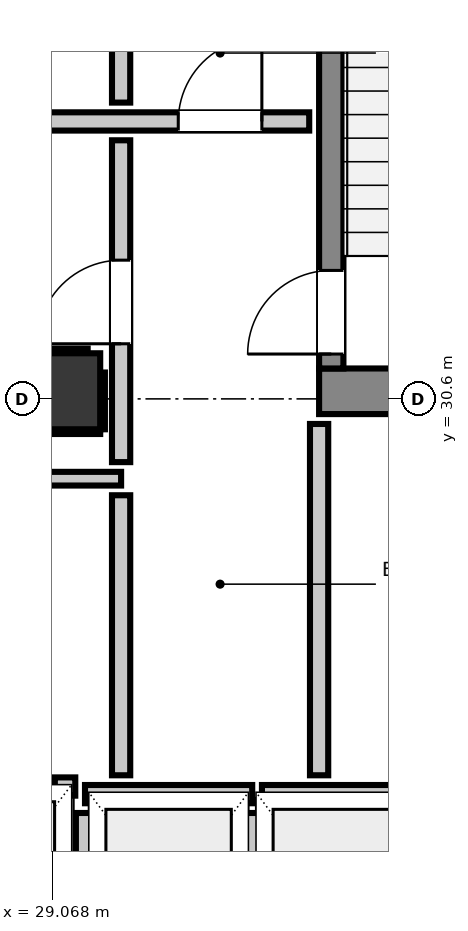
"""IFC4 building model, lengths in metres.
Left out: names, types, materials, properties, quantities, classifications, styles, units other than length and angle.
Written with IfcOpenShell. Run it as: python <this file> out.ifc"""

import sys

from ifc_helpers import new_model, si_unit, direction, frame, frame_2d, origin, origin_2d, place, context, subcontext, project, spatial, rectangle, extrude, element, fill, save


model = new_model("IFC4")
c1 = context("Model", 3, precision=1e-05, world=origin(), true_north=direction((0.0, 1.0)))
c2 = subcontext(c1, "Body", "Model", "MODEL_VIEW")
j1 = project(units=[si_unit("LENGTHUNIT", "METRE"), si_unit("PLANEANGLEUNIT", "RADIAN")], contexts=[c1])
p1 = place(None, origin())
s1 = spatial("IfcSite", under=j1, at=p1, CompositionType="ELEMENT")
p2 = place(p1, origin())
s2 = spatial("IfcBuilding", under=s1, at=p2, CompositionType="ELEMENT")
p3 = place(p2, frame((0.0, 0.0, 165.84)))
s3 = spatial("IfcBuildingStorey", under=s2, at=p3, CompositionType="ELEMENT", Elevation=165.84)
p4 = place(p3, frame((32.58, 30.7, 0.0), z_axis=(0.0, 0.0, 1.0), x_axis=(1.0, 0.0, 0.0)))
e1 = element("IfcWall", 1, at=p4, inside=s3, PredefinedType="SHEAR", context=c2, shape_type="SweptSolid", body=[
    extrude(rectangle(XDim=3.415, YDim=0.6, at=frame_2d((1.708, 0.0))), origin(), (0.0, 0.0, 1.0), 3.32),
])
p5 = place(p3, frame((32.74, 31.0, 0.0), z_axis=(0.0, 0.0, 1.0), x_axis=(0.0, 1.0, 0.0)))
e2 = element("IfcWall", 2, at=p5, inside=s3, PredefinedType="SHEAR", context=c2, shape_type="SweptSolid", body=[
    extrude(rectangle(XDim=7.8, YDim=0.32, at=frame_2d((3.9, 0.0))), origin(), (0.0, 0.0, 1.0), 3.32),
])
p6 = place(p5, frame((0.19, 0.0, 0.0)))
e3 = element("IfcOpeningElement", 3, at=p6, cuts=e2, PredefinedType="OPENING", context=c2, shape_type="SweptSolid", body=[
    extrude(rectangle(XDim=1.1, YDim=2.15, at=frame_2d((0.55, 1.075))), frame((0.0, 0.17, 0.0), z_axis=(0.0, -1.0, 0.0), x_axis=(1.0, 0.0, 0.0)), (0.0, 0.0, 1.0), 0.34),
])
p7 = place(p3, frame((29.2, 30.7, 0.0), z_axis=(0.0, 0.0, 1.0), x_axis=(1.0, 0.0, 0.0)))
e4 = element("IfcColumn", 4, at=p7, inside=s3, PredefinedType="COLUMN", context=c2, shape_type="SweptSolid", body=[
    extrude(rectangle(XDim=1.0, YDim=1.0, at=origin_2d()), origin(), (0.0, 0.0, 1.0), 3.32),
])
p8 = place(p3, frame((29.5, 25.4, 0.0), z_axis=(0.0, 0.0, 1.0), x_axis=(1.0, 0.0, 0.0)))
e5 = element("IfcWall", 5, at=p8, inside=s3, PredefinedType="PARTITIONING", context=c2, shape_type="SweptSolid", body=[
    extrude(rectangle(XDim=2.2, YDim=0.24, at=frame_2d((1.1, 0.0))), origin(), (0.0, 0.0, 1.0), 3.08),
])
p9 = place(p3, frame((29.5, 22.632, 0.0), z_axis=(0.0, 0.0, 1.0), x_axis=(0.0, 1.0, 0.0)))
e6 = element("IfcWall", 6, at=p9, inside=s3, PredefinedType="PARTITIONING", context=c2, shape_type="SweptSolid", body=[
    extrude(rectangle(XDim=2.52, YDim=0.24, at=frame_2d((1.26, 0.0))), origin(), (0.0, 0.0, 1.0), 2.315),
])
p10 = place(p3, frame((31.7, 22.63, 0.0), z_axis=(0.0, 0.0, 1.0), x_axis=(0.0, 1.0, 0.0)))
e7 = element("IfcWall", 7, at=p10, inside=s3, PredefinedType="PARTITIONING", context=c2, shape_type="SweptSolid", body=[
    extrude(rectangle(XDim=2.522, YDim=0.24, at=frame_2d((1.261, 0.0))), origin(), (0.0, 0.0, 1.0), 3.08),
])
p11 = place(p3, frame((31.828, 25.4, 0.0), z_axis=(0.0, 0.0, 1.0), x_axis=(1.0, 0.0, 0.0)))
e8 = element("IfcWall", 8, at=p11, inside=s3, PredefinedType="PARTITIONING", context=c2, shape_type="SweptSolid", body=[
    extrude(rectangle(XDim=2.072, YDim=0.24, at=frame_2d((1.036, 0.0))), origin(), (0.0, 0.0, 1.0), 3.08),
])
p12 = place(p3, frame((29.103, 25.5, 0.0), z_axis=(0.0, 0.0, 1.0), x_axis=(1.0, 0.0, 0.0)))
e9 = element("IfcWall", 9, at=p12, inside=s3, PredefinedType="PARTITIONING", context=c2, shape_type="SweptSolid", body=[
    extrude(rectangle(XDim=0.269, YDim=0.24, at=frame_2d((0.135, 0.0))), origin(), (0.0, 0.0, 1.0), 3.08),
])
p13 = place(p3, frame((28.702, 34.25, 0.0), z_axis=(0.0, 0.0, 1.0), x_axis=(1.0, 0.0, 0.0)))
e10 = element("IfcWall", 10, at=p13, inside=s3, PredefinedType="PARTITIONING", context=c2, shape_type="SweptSolid", body=[
    extrude(rectangle(XDim=3.748, YDim=0.24, at=frame_2d((1.874, 0.0))), origin(), (0.0, 0.0, 1.0), 3.08),
])
p14 = place(p13, frame((2.025, 0.0, 0.0)))
e11 = element("IfcOpeningElement", 11, at=p14, cuts=e10, PredefinedType="OPENING", context=c2, shape_type="SweptSolid", body=[
    extrude(rectangle(XDim=1.1, YDim=2.15, at=frame_2d((0.55, 1.075))), frame((0.0, 0.13, 0.0), z_axis=(0.0, -1.0, 0.0), x_axis=(1.0, 0.0, 0.0)), (0.0, 0.0, 1.0), 0.26),
])
p15 = place(p3, frame((20.65, 29.55, 0.0), z_axis=(0.0, 0.0, 1.0), x_axis=(1.0, 0.0, 0.0)))
e12 = element("IfcWall", 12, at=p15, inside=s3, PredefinedType="PARTITIONING", context=c2, shape_type="SweptSolid", body=[
    extrude(rectangle(XDim=9.325, YDim=0.18, at=frame_2d((4.663, 0.0))), origin(), (0.0, 0.0, 1.0), 3.08),
])
p16 = place(p3, frame((29.975, 25.648, 0.0), z_axis=(0.0, 0.0, 1.0), x_axis=(0.0, 1.0, 0.0)))
e13 = element("IfcWall", 13, at=p16, inside=s3, PredefinedType="PARTITIONING", context=c2, shape_type="SweptSolid", body=[
    extrude(rectangle(XDim=3.684, YDim=0.24, at=frame_2d((1.842, 0.0))), origin(), (0.0, 0.0, 1.0), 3.08),
])
p17 = place(p3, frame((29.975, 29.768, 0.0), z_axis=(0.0, 0.0, 1.0), x_axis=(0.0, 1.0, 0.0)))
e14 = element("IfcWall", 14, at=p17, inside=s3, PredefinedType="PARTITIONING", context=c2, shape_type="SweptSolid", body=[
    extrude(rectangle(XDim=4.234, YDim=0.24, at=frame_2d((2.117, 0.0))), origin(), (0.0, 0.0, 1.0), 3.08),
])
p18 = place(p17, frame((1.557, 0.0, 0.0)))
e15 = element("IfcOpeningElement", 15, at=p18, cuts=e14, PredefinedType="OPENING", context=c2, shape_type="SweptSolid", body=[
    extrude(rectangle(XDim=1.1, YDim=2.15, at=frame_2d((0.55, 1.075))), frame((0.0, 0.13, 0.0), z_axis=(0.0, -1.0, 0.0), x_axis=(1.0, 0.0, 0.0)), (0.0, 0.0, 1.0), 0.26),
])
p19 = place(p3, frame((29.975, 34.498, 0.0), z_axis=(0.0, 0.0, 1.0), x_axis=(0.0, 1.0, 0.0)))
e16 = element("IfcWall", 16, at=p19, inside=s3, PredefinedType="PARTITIONING", context=c2, shape_type="SweptSolid", body=[
    extrude(rectangle(XDim=0.964, YDim=0.24, at=frame_2d((0.482, 0.0))), origin(), (0.0, 0.0, 1.0), 3.08),
])
p20 = place(p3, frame((32.58, 25.648, 0.0), z_axis=(0.0, 0.0, 1.0), x_axis=(0.0, 1.0, 0.0)))
e17 = element("IfcWall", 17, at=p20, inside=s3, PredefinedType="PARTITIONING", context=c2, shape_type="SweptSolid", body=[
    extrude(rectangle(XDim=4.622, YDim=0.24, at=frame_2d((2.311, 0.0))), origin(), (0.0, 0.0, 1.0), 3.08),
])
p21 = place(p3, frame((28.7, 30.168, 0.0), z_axis=(0.0, 0.0, 1.0), x_axis=(1.0, 0.0, 0.0)))
e18 = element("IfcWall", 18, at=p21, inside=s3, PredefinedType="PARTITIONING", context=c2, shape_type="SweptSolid", body=[
    extrude(rectangle(XDim=1.0, YDim=0.06, at=frame_2d((0.5, 0.0))), origin(), (0.0, 0.0, 1.0), 1.45),
])
p22 = place(p3, frame((28.7, 31.232, 0.0), z_axis=(0.0, 0.0, 1.0), x_axis=(1.0, 0.0, 0.0)))
e19 = element("IfcWall", 19, at=p22, inside=s3, PredefinedType="PARTITIONING", context=c2, shape_type="SweptSolid", body=[
    extrude(rectangle(XDim=0.835, YDim=0.06, at=frame_2d((0.417, 0.0))), origin(), (0.0, 0.0, 1.0), 1.45),
])
p23 = place(p3, frame((29.732, 30.2, 0.0), z_axis=(0.0, 0.0, 1.0), x_axis=(0.0, 1.0, 0.0)))
e20 = element("IfcWall", 20, at=p23, inside=s3, PredefinedType="PARTITIONING", context=c2, shape_type="SweptSolid", body=[
    extrude(rectangle(XDim=0.747, YDim=0.06, at=frame_2d((0.374, 0.0))), origin(), (0.0, 0.0, 1.0), 1.45),
])
p24 = place(p6, origin())
e21 = element("IfcDoor", 21, at=p24, inside=s3, OperationType="SINGLE_SWING_LEFT", PredefinedType="DOOR", context=c2, shape_type="SweptSolid", body=[
    extrude(rectangle(XDim=1.1, YDim=2.15, at=frame_2d((0.55, 1.075))), frame((0.0, 0.025, 0.0), z_axis=(0.0, -1.0, 0.0), x_axis=(1.0, 0.0, 0.0)), (0.0, 0.0, 1.0), 0.05),
])
fill(e3, e21)
p25 = place(p18, origin())
e22 = element("IfcDoor", 22, at=p25, inside=s3, OperationType="SINGLE_SWING_LEFT", PredefinedType="DOOR", context=c2, shape_type="SweptSolid", body=[
    extrude(rectangle(XDim=1.1, YDim=2.15, at=frame_2d((0.55, 1.075))), frame((0.0, 0.025, 0.0), z_axis=(0.0, -1.0, 0.0), x_axis=(1.0, 0.0, 0.0)), (0.0, 0.0, 1.0), 0.05),
])
fill(e15, e22)
p26 = place(p14, origin())
e23 = element("IfcDoor", 23, at=p26, inside=s3, OperationType="SINGLE_SWING_RIGHT", PredefinedType="DOOR", context=c2, shape_type="SweptSolid", body=[
    extrude(rectangle(XDim=1.1, YDim=2.15, at=frame_2d((0.55, 1.075))), frame((0.0, 0.025, 0.0), z_axis=(0.0, -1.0, 0.0), x_axis=(1.0, 0.0, 0.0)), (0.0, 0.0, 1.0), 0.05),
])
fill(e11, e23)
save(model, sys.argv[1])
